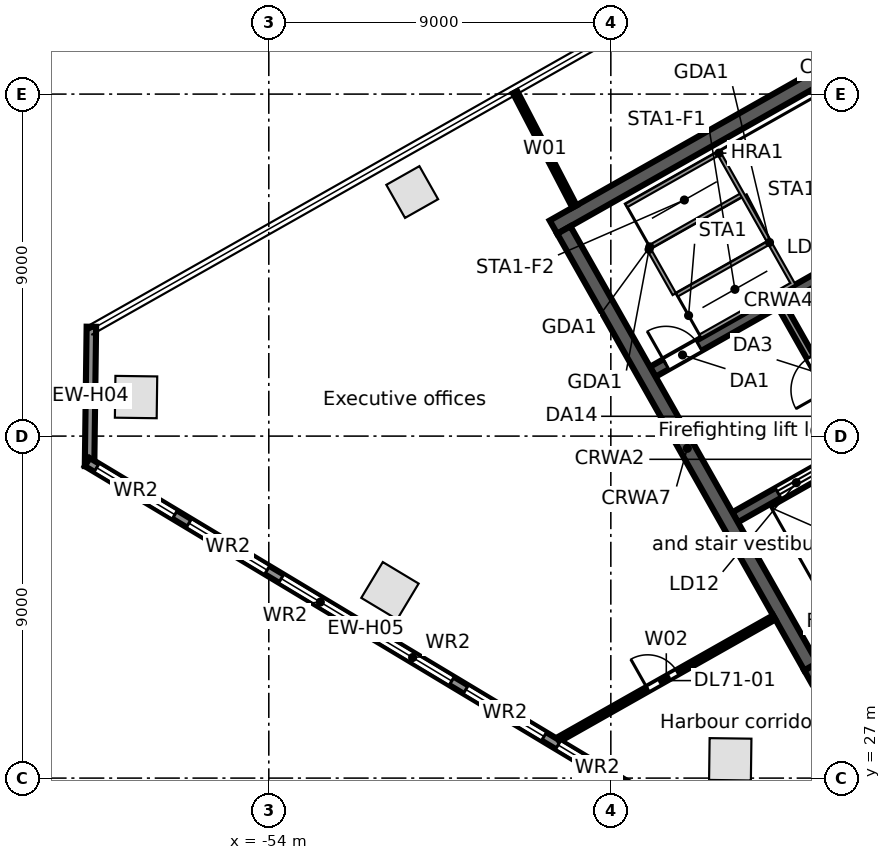
"""IFC4 building model, lengths in metres.
Left out: names, types, materials, properties, quantities, classifications, styles, units other than length and angle.
Written with IfcOpenShell. Run it as: python <this file> out.ifc"""

import sys

from ifc_helpers import new_model, si_unit, direction, frame, frame_2d, origin, origin_2d, place, context, subcontext, project, spatial, rectangle, extrude, element, fill, save


model = new_model("IFC4")
c1 = context("Model", 3, precision=1e-05, world=origin(), true_north=direction((0.0, 1.0)))
c2 = subcontext(c1, "Body", "Model", "MODEL_VIEW")
j1 = project(units=[si_unit("LENGTHUNIT", "METRE"), si_unit("PLANEANGLEUNIT", "RADIAN")], contexts=[c1])
p1 = place(None, origin())
s1 = spatial("IfcSite", under=j1, at=p1, CompositionType="ELEMENT")
p2 = place(p1, origin())
s2 = spatial("IfcBuilding", under=s1, at=p2, CompositionType="ELEMENT")
p3 = place(p2, frame((0.0, 0.0, 316.5)))
s3 = spatial("IfcBuildingStorey", under=s2, at=p3, CompositionType="ELEMENT", Elevation=316.5)
p4 = place(p3, frame((-50.226, 42.423, 0.0), z_axis=(0.0, 0.0, 1.0), x_axis=(-0.87035569594, -0.492423560103, 0.0)))
e1 = element("IfcColumn", 1, at=p4, inside=s3, PredefinedType="COLUMN", context=c2, shape_type="SweptSolid", body=[
    extrude(rectangle(XDim=1.0, YDim=1.0, at=origin_2d()), origin(), (0.0, 0.0, 1.0), 3.8),
])
for number, where, z_axis, x_axis in (
    (2, (-57.493, 37.027, 0.0), (0.0, 0.0, 1.0), (-0.013, -1.0, 0.0)),
    (3, (-50.812, 31.931, 0.0), (0.0, 0.0, 1.0), (0.857, -0.515, 0.0)),
    (4, (-41.858, 27.495, 0.0), (0.0, 0.0, 1.0), (1.0, -0.013, 0.0)),
):
    element("IfcColumn", number, at=place(p3, frame(where, z_axis=z_axis, x_axis=x_axis)), inside=s3, PredefinedType="COLUMN", context=c2, shape_type="SweptSolid", body=[
        extrude(rectangle(XDim=1.1, YDim=1.1, at=origin_2d()), origin(), (0.0, 0.0, 1.0), 3.8),
    ])
p5 = place(p3, frame((-58.717, 35.208, 0.0), z_axis=(0.0, 0.0, 1.0), x_axis=(0.01310512158, 0.999914124207, 0.0)))
e5 = element("IfcWall", 5, at=p5, inside=s3, PredefinedType="STANDARD", context=c2, shape_type="SweptSolid", body=[
    extrude(rectangle(XDim=3.67, YDim=0.25, at=frame_2d((1.835, 0.0))), origin(), (0.0, 0.0, 1.0), 3.52),
])
p6 = place(p3, frame((-44.115, 26.507, 0.0), z_axis=(0.0, 0.0, 1.0), x_axis=(-0.857166583633, 0.515039268311, 0.0)))
e6 = element("IfcWall", 6, at=p6, inside=s3, PredefinedType="STANDARD", context=c2, shape_type="SweptSolid", body=[
    extrude(rectangle(XDim=17.106, YDim=0.25, at=frame_2d((8.553, 0.0))), origin(), (0.0, 0.0, 1.0), 3.52),
])
p7 = place(p6, frame((14.417, 0.0, 0.8)))
e7 = element("IfcOpeningElement", 7, at=p7, cuts=e6, PredefinedType="OPENING", context=c2, shape_type="SweptSolid", body=[
    extrude(rectangle(XDim=2.4, YDim=2.2, at=frame_2d((1.2, 1.1))), frame((0.0, 0.135, 0.0), z_axis=(0.0, -1.0, 0.0), x_axis=(1.0, 0.0, 0.0)), (0.0, 0.0, 1.0), 0.27),
])
p8 = place(p6, frame((11.584, 0.0, 0.8)))
e8 = element("IfcOpeningElement", 8, at=p8, cuts=e6, PredefinedType="OPENING", context=c2, shape_type="SweptSolid", body=[
    extrude(rectangle(XDim=2.4, YDim=2.2, at=frame_2d((1.2, 1.1))), frame((0.0, 0.135, 0.0), z_axis=(0.0, -1.0, 0.0), x_axis=(1.0, 0.0, 0.0)), (0.0, 0.0, 1.0), 0.27),
])
p9 = place(p6, frame((8.75, 0.0, 0.8)))
e9 = element("IfcOpeningElement", 9, at=p9, cuts=e6, PredefinedType="OPENING", context=c2, shape_type="SweptSolid", body=[
    extrude(rectangle(XDim=2.4, YDim=2.2, at=frame_2d((1.2, 1.1))), frame((0.0, 0.135, 0.0), z_axis=(0.0, -1.0, 0.0), x_axis=(1.0, 0.0, 0.0)), (0.0, 0.0, 1.0), 0.27),
])
p10 = place(p6, frame((5.917, 0.0, 0.8)))
e10 = element("IfcOpeningElement", 10, at=p10, cuts=e6, PredefinedType="OPENING", context=c2, shape_type="SweptSolid", body=[
    extrude(rectangle(XDim=2.4, YDim=2.2, at=frame_2d((1.2, 1.1))), frame((0.0, 0.135, 0.0), z_axis=(0.0, -1.0, 0.0), x_axis=(1.0, 0.0, 0.0)), (0.0, 0.0, 1.0), 0.27),
])
p11 = place(p6, frame((3.084, 0.0, 0.8)))
e11 = element("IfcOpeningElement", 11, at=p11, cuts=e6, PredefinedType="OPENING", context=c2, shape_type="SweptSolid", body=[
    extrude(rectangle(XDim=2.4, YDim=2.2, at=frame_2d((1.2, 1.1))), frame((0.0, 0.135, 0.0), z_axis=(0.0, -1.0, 0.0), x_axis=(1.0, 0.0, 0.0)), (0.0, 0.0, 1.0), 0.27),
])
p12 = place(p6, frame((0.25, 0.0, 0.8)))
e12 = element("IfcOpeningElement", 12, at=p12, cuts=e6, PredefinedType="OPENING", context=c2, shape_type="SweptSolid", body=[
    extrude(rectangle(XDim=2.4, YDim=2.2, at=frame_2d((1.2, 1.1))), frame((0.0, 0.135, 0.0), z_axis=(0.0, -1.0, 0.0), x_axis=(1.0, 0.0, 0.0)), (0.0, 0.0, 1.0), 0.27),
])
p13 = place(p3, frame((-39.813, 29.662, 0.0), z_axis=(0.0, 0.0, 1.0), x_axis=(0.870350116061, 0.492433422375, 0.0)))
e13 = element("IfcWall", 13, at=p13, inside=s3, PredefinedType="SOLIDWALL", context=c2, shape_type="SweptSolid", body=[
    extrude(rectangle(XDim=17.0, YDim=0.4, at=frame_2d((8.5, 0.0))), origin(), (0.0, 0.0, 1.0), 3.52),
])
p14 = place(p13, frame((7.2, 0.0, 0.0)))
e14 = element("IfcOpeningElement", 14, at=p14, cuts=e13, PredefinedType="OPENING", context=c2, shape_type="SweptSolid", body=[
    extrude(rectangle(XDim=1.2, YDim=2.1, at=frame_2d((0.6, 1.05))), frame((0.0, 0.21, 0.0), z_axis=(0.0, -1.0, 0.0), x_axis=(1.0, 0.0, 0.0)), (0.0, 0.0, 1.0), 0.42),
])
p15 = place(p3, frame((-41.73, 33.863, 0.0), z_axis=(0.0, 0.0, 1.0), x_axis=(0.870350800578, 0.492432212525, 0.0)))
e15 = element("IfcWall", 15, at=p15, inside=s3, PredefinedType="SOLIDWALL", context=c2, shape_type="SweptSolid", body=[
    extrude(rectangle(XDim=6.2, YDim=0.3, at=frame_2d((3.1, 0.0))), origin(), (0.0, 0.0, 1.0), 3.52),
])
p16 = place(p15, frame((1.3, 0.0, 0.0)))
e16 = element("IfcOpeningElement", 16, at=p16, cuts=e15, PredefinedType="OPENING", context=c2, shape_type="SweptSolid", body=[
    extrude(rectangle(XDim=1.1, YDim=2.1, at=frame_2d((0.55, 1.05))), frame((0.0, 0.16, 0.0), z_axis=(0.0, -1.0, 0.0), x_axis=(1.0, 0.0, 0.0)), (0.0, 0.0, 1.0), 0.32),
])
p17 = place(p15, frame((4.95, 0.0, 0.0)))
e17 = element("IfcOpeningElement", 17, at=p17, cuts=e15, PredefinedType="OPENING", context=c2, shape_type="SweptSolid", body=[
    extrude(rectangle(XDim=0.9, YDim=2.1, at=frame_2d((0.45, 1.05))), frame((0.0, 0.16, 0.0), z_axis=(0.0, -1.0, 0.0), x_axis=(1.0, 0.0, 0.0)), (0.0, 0.0, 1.0), 0.32),
])
p18 = place(p3, frame((-43.897, 37.692, 0.0), z_axis=(0.0, 0.0, 1.0), x_axis=(0.870356351998, 0.492422400523, 0.0)))
e18 = element("IfcWall", 18, at=p18, inside=s3, PredefinedType="SOLIDWALL", context=c2, shape_type="SweptSolid", body=[
    extrude(rectangle(XDim=7.6, YDim=0.3, at=frame_2d((3.8, 0.0))), origin(), (0.0, 0.0, 1.0), 3.52),
])
p19 = place(p18, frame((0.4, 0.0, 0.0)))
e19 = element("IfcOpeningElement", 19, at=p19, cuts=e18, PredefinedType="OPENING", context=c2, shape_type="SweptSolid", body=[
    extrude(rectangle(XDim=1.0, YDim=2.1, at=frame_2d((0.5, 1.05))), frame((0.0, 0.16, 0.0), z_axis=(0.0, -1.0, 0.0), x_axis=(1.0, 0.0, 0.0)), (0.0, 0.0, 1.0), 0.32),
])
p20 = place(p3, frame((-46.51, 41.499, 0.0), z_axis=(0.0, 0.0, 1.0), x_axis=(0.870356271124, 0.492422543467, 0.0)))
e20 = element("IfcWall", 20, at=p20, inside=s3, PredefinedType="SOLIDWALL", context=c2, shape_type="SweptSolid", body=[
    extrude(rectangle(XDim=17.0, YDim=0.4, at=frame_2d((8.5, 0.0))), origin(), (0.0, 0.0, 1.0), 3.52),
])
p21 = place(p3, frame((-46.238, 41.423, 0.0), z_axis=(0.0, 0.0, 1.0), x_axis=(0.492421663121, -0.870356769198, 0.0)))
e21 = element("IfcWall", 21, at=p21, inside=s3, PredefinedType="SOLIDWALL", context=c2, shape_type="SweptSolid", body=[
    extrude(rectangle(XDim=13.2, YDim=0.4, at=frame_2d((6.6, 0.0))), origin(), (0.0, 0.0, 1.0), 3.52),
])
p22 = place(p3, frame((-40.516, 39.433, 0.0), z_axis=(0.0, 0.0, 1.0), x_axis=(0.492453559952, -0.87033872216, 0.0)))
e22 = element("IfcWall", 22, at=p22, inside=s3, PredefinedType="PARTITIONING", context=c2, shape_type="SweptSolid", body=[
    extrude(rectangle(XDim=4.1, YDim=0.2, at=frame_2d((2.05, 0.0))), origin(), (0.0, 0.0, 1.0), 3.52),
])
p23 = place(p22, frame((1.55, 0.0, 0.0)))
e23 = element("IfcOpeningElement", 23, at=p23, cuts=e22, PredefinedType="OPENING", context=c2, shape_type="SweptSolid", body=[
    extrude(rectangle(XDim=1.0, YDim=2.1, at=frame_2d((0.5, 1.05))), frame((0.0, 0.11, 0.0), z_axis=(0.0, -1.0, 0.0), x_axis=(1.0, 0.0, 0.0)), (0.0, 0.0, 1.0), 0.22),
])
p24 = place(p3, frame((-47.517, 45.047, 0.0), z_axis=(0.0, 0.0, 1.0), x_axis=(0.460973607079, -0.887413845721, 0.0)))
e24 = element("IfcWall", 24, at=p24, inside=s3, PredefinedType="PARTITIONING", context=c2, shape_type="SweptSolid", body=[
    extrude(rectangle(XDim=3.386, YDim=0.125, at=frame_2d((1.693, 0.0))), origin(), (0.0, 0.0, 1.0), 2.888),
])
p25 = place(p3, frame((-46.381, 28.015, 0.0), z_axis=(0.0, 0.0, 1.0), x_axis=(0.870364232693, 0.492408471139, 0.0)))
e25 = element("IfcWall", 25, at=p25, inside=s3, PredefinedType="PARTITIONING", context=c2, shape_type="SweptSolid", body=[
    extrude(rectangle(XDim=6.527, YDim=0.125, at=frame_2d((3.264, 0.0))), origin(), (0.0, 0.0, 1.0), 2.8),
])
p26 = place(p25, frame((2.7, 0.0, 0.0)))
e26 = element("IfcOpeningElement", 26, at=p26, cuts=e25, PredefinedType="OPENING", context=c2, shape_type="SweptSolid", body=[
    extrude(rectangle(XDim=0.9, YDim=2.1, at=frame_2d((0.45, 1.05))), frame((0.0, 0.073, 0.0), z_axis=(0.0, -1.0, 0.0), x_axis=(1.0, 0.0, 0.0)), (0.0, 0.0, 1.0), 0.145),
])
p27 = place(p7, origin())
e27 = element("IfcWindow", 27, at=p27, inside=s3, PartitioningType="SINGLE_PANEL", PredefinedType="WINDOW", context=c2, shape_type="SweptSolid", body=[
    extrude(rectangle(XDim=2.4, YDim=2.2, at=frame_2d((1.2, 1.1))), frame((0.0, 0.03, 0.0), z_axis=(0.0, -1.0, 0.0), x_axis=(1.0, 0.0, 0.0)), (0.0, 0.0, 1.0), 0.06),
])
fill(e7, e27)
p28 = place(p8, origin())
e28 = element("IfcWindow", 28, at=p28, inside=s3, PartitioningType="SINGLE_PANEL", PredefinedType="WINDOW", context=c2, shape_type="SweptSolid", body=[
    extrude(rectangle(XDim=2.4, YDim=2.2, at=frame_2d((1.2, 1.1))), frame((0.0, 0.03, 0.0), z_axis=(0.0, -1.0, 0.0), x_axis=(1.0, 0.0, 0.0)), (0.0, 0.0, 1.0), 0.06),
])
fill(e8, e28)
p29 = place(p9, origin())
e29 = element("IfcWindow", 29, at=p29, inside=s3, PartitioningType="SINGLE_PANEL", PredefinedType="WINDOW", context=c2, shape_type="SweptSolid", body=[
    extrude(rectangle(XDim=2.4, YDim=2.2, at=frame_2d((1.2, 1.1))), frame((0.0, 0.03, 0.0), z_axis=(0.0, -1.0, 0.0), x_axis=(1.0, 0.0, 0.0)), (0.0, 0.0, 1.0), 0.06),
])
fill(e9, e29)
p30 = place(p10, origin())
e30 = element("IfcWindow", 30, at=p30, inside=s3, PartitioningType="SINGLE_PANEL", PredefinedType="WINDOW", context=c2, shape_type="SweptSolid", body=[
    extrude(rectangle(XDim=2.4, YDim=2.2, at=frame_2d((1.2, 1.1))), frame((0.0, 0.03, 0.0), z_axis=(0.0, -1.0, 0.0), x_axis=(1.0, 0.0, 0.0)), (0.0, 0.0, 1.0), 0.06),
])
fill(e10, e30)
p31 = place(p11, origin())
e31 = element("IfcWindow", 31, at=p31, inside=s3, PartitioningType="SINGLE_PANEL", PredefinedType="WINDOW", context=c2, shape_type="SweptSolid", body=[
    extrude(rectangle(XDim=2.4, YDim=2.2, at=frame_2d((1.2, 1.1))), frame((0.0, 0.03, 0.0), z_axis=(0.0, -1.0, 0.0), x_axis=(1.0, 0.0, 0.0)), (0.0, 0.0, 1.0), 0.06),
])
fill(e11, e31)
p32 = place(p12, origin())
e32 = element("IfcWindow", 32, at=p32, inside=s3, PartitioningType="SINGLE_PANEL", PredefinedType="WINDOW", context=c2, shape_type="SweptSolid", body=[
    extrude(rectangle(XDim=2.4, YDim=2.2, at=frame_2d((1.2, 1.1))), frame((0.0, 0.03, 0.0), z_axis=(0.0, -1.0, 0.0), x_axis=(1.0, 0.0, 0.0)), (0.0, 0.0, 1.0), 0.06),
])
fill(e12, e32)
p33 = place(p16, origin())
e33 = element("IfcDoor", 33, at=p33, inside=s3, OperationType="DOUBLE_DOOR_SLIDING", PredefinedType="DOOR", context=c2, shape_type="SweptSolid", body=[
    extrude(rectangle(XDim=1.1, YDim=2.1, at=frame_2d((0.55, 1.05))), frame((0.0, 0.025, 0.0), z_axis=(0.0, -1.0, 0.0), x_axis=(1.0, 0.0, 0.0)), (0.0, 0.0, 1.0), 0.05),
])
fill(e16, e33)
p34 = place(p19, origin())
e34 = element("IfcDoor", 34, at=p34, inside=s3, OperationType="SINGLE_SWING_LEFT", PredefinedType="DOOR", context=c2, shape_type="SweptSolid", body=[
    extrude(rectangle(XDim=1.0, YDim=2.1, at=frame_2d((0.5, 1.05))), frame((0.0, 0.025, 0.0), z_axis=(0.0, -1.0, 0.0), x_axis=(1.0, 0.0, 0.0)), (0.0, 0.0, 1.0), 0.05),
])
fill(e19, e34)
p35 = place(p23, frame((1.0, 0.0, 0.0), z_axis=(0.0, 0.0, 1.0), x_axis=(-1.0, 0.0, 0.0)))
e35 = element("IfcDoor", 35, at=p35, inside=s3, OperationType="SINGLE_SWING_LEFT", PredefinedType="DOOR", context=c2, shape_type="SweptSolid", body=[
    extrude(rectangle(XDim=1.0, YDim=2.1, at=frame_2d((0.5, 1.05))), frame((0.0, 0.025, 0.0), z_axis=(0.0, -1.0, 0.0), x_axis=(1.0, 0.0, 0.0)), (0.0, 0.0, 1.0), 0.05),
])
fill(e23, e35)
p36 = place(p26, origin())
e36 = element("IfcDoor", 36, at=p36, inside=s3, OperationType="SINGLE_SWING_LEFT", PredefinedType="DOOR", context=c2, shape_type="SweptSolid", body=[
    extrude(rectangle(XDim=0.9, YDim=2.1, at=frame_2d((0.45, 1.05))), frame((0.0, 0.025, 0.0), z_axis=(0.0, -1.0, 0.0), x_axis=(1.0, 0.0, 0.0)), (0.0, 0.0, 1.0), 0.05),
])
fill(e26, e36)
save(model, sys.argv[1])
